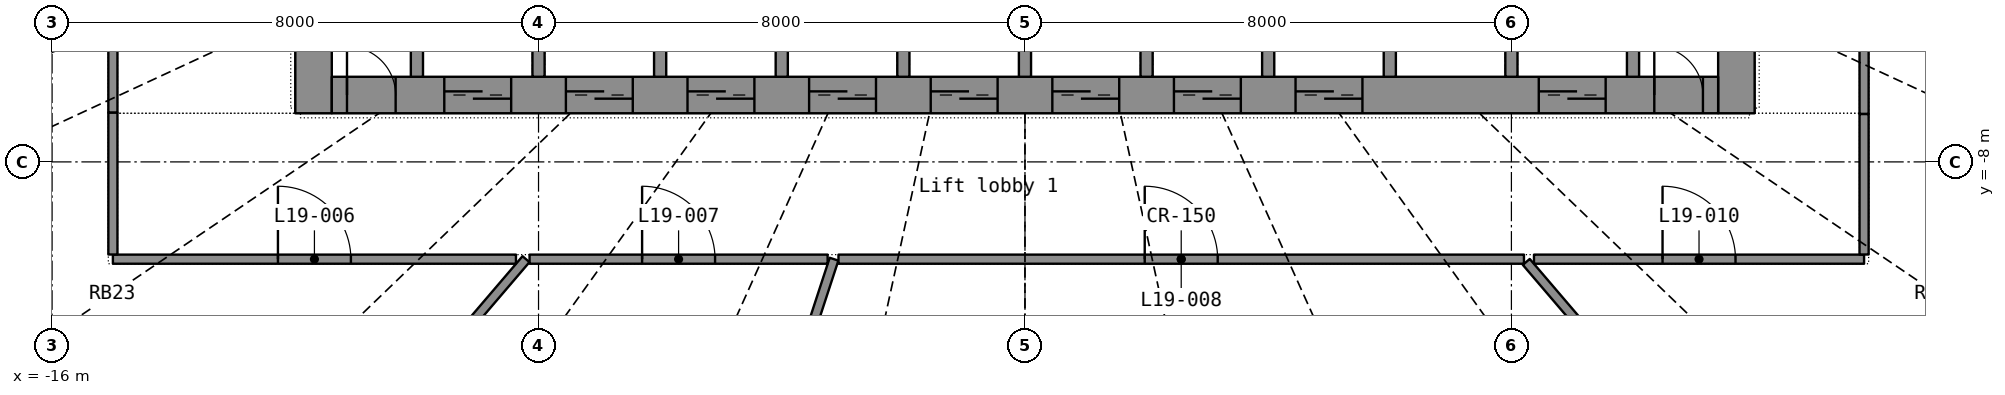
"""IFC4 building model, lengths in metres.
Left out: names, types, materials, properties, quantities, classifications, styles, units other than length and angle.
Written with IfcOpenShell. Run it as: python <this file> out.ifc"""

import sys

from ifc_helpers import new_model, si_unit, direction, frame, frame_2d, origin, place, context, subcontext, project, spatial, rectangle, extrude, element, fill, save


model = new_model("IFC4")
c1 = context("Model", 3, precision=1e-05, world=origin(), true_north=direction((0.0, 1.0)))
c2 = subcontext(c1, "Body", "Model", "MODEL_VIEW")
j1 = project(units=[si_unit("LENGTHUNIT", "METRE"), si_unit("PLANEANGLEUNIT", "RADIAN")], contexts=[c1])
p1 = place(None, origin())
s1 = spatial("IfcSite", under=j1, at=p1, CompositionType="ELEMENT")
p2 = place(p1, origin())
s2 = spatial("IfcBuilding", under=s1, at=p2, CompositionType="ELEMENT")
p3 = place(p2, frame((0.0, 0.0, 81.5)))
s3 = spatial("IfcBuildingStorey", under=s2, at=p3, CompositionType="ELEMENT", Elevation=81.5)
p4 = place(p3, frame((-11.7, -7.2, 0.0), z_axis=(0.0, 0.0, 1.0), x_axis=(0.0, 1.0, 0.0)))
e1 = element("IfcWall", 1, at=p4, inside=s3, PredefinedType="SHEAR", context=c2, shape_type="SweptSolid", body=[
    extrude(rectangle(XDim=14.4, YDim=0.6, at=frame_2d((7.2, 0.0))), origin(), (0.0, 0.0, 1.0), 3.3),
])
p5 = place(p4, frame((6.5, 0.0, 0.0)))
e2 = element("IfcOpeningElement", 2, at=p5, cuts=e1, PredefinedType="OPENING", context=c2, shape_type="SweptSolid", body=[
    extrude(rectangle(XDim=1.4, YDim=2.2, at=frame_2d((0.7, 1.1))), frame((0.0, 0.31, 0.0), z_axis=(0.0, -1.0, 0.0), x_axis=(1.0, 0.0, 0.0)), (0.0, 0.0, 1.0), 0.62),
])
p6 = place(p3, frame((11.7, -7.2, 0.0), z_axis=(0.0, 0.0, 1.0), x_axis=(0.0, 1.0, 0.0)))
e3 = element("IfcWall", 3, at=p6, inside=s3, PredefinedType="SHEAR", context=c2, shape_type="SweptSolid", body=[
    extrude(rectangle(XDim=14.4, YDim=0.6, at=frame_2d((7.2, 0.0))), origin(), (0.0, 0.0, 1.0), 3.3),
])
p7 = place(p6, frame((6.5, 0.0, 0.0)))
e4 = element("IfcOpeningElement", 4, at=p7, cuts=e3, PredefinedType="OPENING", context=c2, shape_type="SweptSolid", body=[
    extrude(rectangle(XDim=1.4, YDim=2.2, at=frame_2d((0.7, 1.1))), frame((0.0, 0.31, 0.0), z_axis=(0.0, -1.0, 0.0), x_axis=(1.0, 0.0, 0.0)), (0.0, 0.0, 1.0), 0.62),
])
p8 = place(p3, frame((-11.4, -6.9, 0.0), z_axis=(0.0, 0.0, 1.0), x_axis=(1.0, 0.0, 0.0)))
e5 = element("IfcWall", 5, at=p8, inside=s3, PredefinedType="SHEAR", context=c2, shape_type="SweptSolid", body=[
    extrude(rectangle(XDim=22.8, YDim=0.6, at=frame_2d((11.4, 0.0))), origin(), (0.0, 0.0, 1.0), 3.3),
])
p9 = place(p8, frame((1.85, 0.0, 0.0)))
e6 = element("IfcOpeningElement", 6, at=p9, cuts=e5, PredefinedType="OPENING", context=c2, shape_type="SweptSolid", body=[
    extrude(rectangle(XDim=1.1, YDim=2.2, at=frame_2d((0.55, 1.1))), frame((0.0, 0.31, 0.0), z_axis=(0.0, -1.0, 0.0), x_axis=(1.0, 0.0, 0.0)), (0.0, 0.0, 1.0), 0.62),
])
p10 = place(p8, frame((3.85, 0.0, 0.0)))
e7 = element("IfcOpeningElement", 7, at=p10, cuts=e5, PredefinedType="OPENING", context=c2, shape_type="SweptSolid", body=[
    extrude(rectangle(XDim=1.1, YDim=2.2, at=frame_2d((0.55, 1.1))), frame((0.0, 0.31, 0.0), z_axis=(0.0, -1.0, 0.0), x_axis=(1.0, 0.0, 0.0)), (0.0, 0.0, 1.0), 0.62),
])
p11 = place(p8, frame((5.85, 0.0, 0.0)))
e8 = element("IfcOpeningElement", 8, at=p11, cuts=e5, PredefinedType="OPENING", context=c2, shape_type="SweptSolid", body=[
    extrude(rectangle(XDim=1.1, YDim=2.2, at=frame_2d((0.55, 1.1))), frame((0.0, 0.31, 0.0), z_axis=(0.0, -1.0, 0.0), x_axis=(1.0, 0.0, 0.0)), (0.0, 0.0, 1.0), 0.62),
])
p12 = place(p8, frame((7.85, 0.0, 0.0)))
e9 = element("IfcOpeningElement", 9, at=p12, cuts=e5, PredefinedType="OPENING", context=c2, shape_type="SweptSolid", body=[
    extrude(rectangle(XDim=1.1, YDim=2.2, at=frame_2d((0.55, 1.1))), frame((0.0, 0.31, 0.0), z_axis=(0.0, -1.0, 0.0), x_axis=(1.0, 0.0, 0.0)), (0.0, 0.0, 1.0), 0.62),
])
p13 = place(p8, frame((9.85, 0.0, 0.0)))
e10 = element("IfcOpeningElement", 10, at=p13, cuts=e5, PredefinedType="OPENING", context=c2, shape_type="SweptSolid", body=[
    extrude(rectangle(XDim=1.1, YDim=2.2, at=frame_2d((0.55, 1.1))), frame((0.0, 0.31, 0.0), z_axis=(0.0, -1.0, 0.0), x_axis=(1.0, 0.0, 0.0)), (0.0, 0.0, 1.0), 0.62),
])
p14 = place(p8, frame((11.85, 0.0, 0.0)))
e11 = element("IfcOpeningElement", 11, at=p14, cuts=e5, PredefinedType="OPENING", context=c2, shape_type="SweptSolid", body=[
    extrude(rectangle(XDim=1.1, YDim=2.2, at=frame_2d((0.55, 1.1))), frame((0.0, 0.31, 0.0), z_axis=(0.0, -1.0, 0.0), x_axis=(1.0, 0.0, 0.0)), (0.0, 0.0, 1.0), 0.62),
])
p15 = place(p8, frame((13.85, 0.0, 0.0)))
e12 = element("IfcOpeningElement", 12, at=p15, cuts=e5, PredefinedType="OPENING", context=c2, shape_type="SweptSolid", body=[
    extrude(rectangle(XDim=1.1, YDim=2.2, at=frame_2d((0.55, 1.1))), frame((0.0, 0.31, 0.0), z_axis=(0.0, -1.0, 0.0), x_axis=(1.0, 0.0, 0.0)), (0.0, 0.0, 1.0), 0.62),
])
p16 = place(p8, frame((15.85, 0.0, 0.0)))
e13 = element("IfcOpeningElement", 13, at=p16, cuts=e5, PredefinedType="OPENING", context=c2, shape_type="SweptSolid", body=[
    extrude(rectangle(XDim=1.1, YDim=2.2, at=frame_2d((0.55, 1.1))), frame((0.0, 0.31, 0.0), z_axis=(0.0, -1.0, 0.0), x_axis=(1.0, 0.0, 0.0)), (0.0, 0.0, 1.0), 0.62),
])
p17 = place(p8, frame((19.85, 0.0, 0.0)))
e14 = element("IfcOpeningElement", 14, at=p17, cuts=e5, PredefinedType="OPENING", context=c2, shape_type="SweptSolid", body=[
    extrude(rectangle(XDim=1.1, YDim=2.2, at=frame_2d((0.55, 1.1))), frame((0.0, 0.31, 0.0), z_axis=(0.0, -1.0, 0.0), x_axis=(1.0, 0.0, 0.0)), (0.0, 0.0, 1.0), 0.62),
])
p18 = place(p8, frame((0.25, 0.0, 0.0)))
e15 = element("IfcOpeningElement", 15, at=p18, cuts=e5, PredefinedType="OPENING", context=c2, shape_type="SweptSolid", body=[
    extrude(rectangle(XDim=0.8, YDim=2.05, at=frame_2d((0.4, 1.025))), frame((0.0, 0.31, 0.0), z_axis=(0.0, -1.0, 0.0), x_axis=(1.0, 0.0, 0.0)), (0.0, 0.0, 1.0), 0.62),
])
p19 = place(p8, frame((21.75, 0.0, 0.0)))
e16 = element("IfcOpeningElement", 16, at=p19, cuts=e5, PredefinedType="OPENING", context=c2, shape_type="SweptSolid", body=[
    extrude(rectangle(XDim=0.8, YDim=2.05, at=frame_2d((0.4, 1.025))), frame((0.0, 0.31, 0.0), z_axis=(0.0, -1.0, 0.0), x_axis=(1.0, 0.0, 0.0)), (0.0, 0.0, 1.0), 0.62),
])
for number, where, z_axis, x_axis in (
    (17, (-10.0, -6.6, 0.0), (0.0, 0.0, 1.0), (0.0, 1.0, 0.0)),
    (18, (-8.0, -6.6, 0.0), (0.0, 0.0, 1.0), (0.0, 1.0, 0.0)),
    (19, (-6.0, -6.6, 0.0), (0.0, 0.0, 1.0), (0.0, 1.0, 0.0)),
    (20, (-4.0, -6.6, 0.0), (0.0, 0.0, 1.0), (0.0, 1.0, 0.0)),
    (21, (-2.0, -6.6, 0.0), (0.0, 0.0, 1.0), (0.0, 1.0, 0.0)),
    (22, (0.0, -6.6, 0.0), (0.0, 0.0, 1.0), (0.0, 1.0, 0.0)),
    (23, (2.0, -6.6, 0.0), (0.0, 0.0, 1.0), (0.0, 1.0, 0.0)),
    (24, (4.0, -6.6, 0.0), (0.0, 0.0, 1.0), (0.0, 1.0, 0.0)),
    (25, (6.0, -6.6, 0.0), (0.0, 0.0, 1.0), (0.0, 1.0, 0.0)),
    (26, (8.0, -6.6, 0.0), (0.0, 0.0, 1.0), (0.0, 1.0, 0.0)),
    (27, (10.0, -6.6, 0.0), (0.0, 0.0, 1.0), (0.0, 1.0, 0.0)),
):
    element("IfcWall", number, at=place(p3, frame(where, z_axis=z_axis, x_axis=x_axis)), inside=s3, PredefinedType="SHEAR", context=c2, shape_type="SweptSolid", body=[
        extrude(rectangle(XDim=2.7, YDim=0.2, at=frame_2d((1.35, 0.0))), origin(), (0.0, 0.0, 1.0), 3.3),
    ])
p20 = place(p3, frame((-6.829, -20.875, 0.0), z_axis=(0.0, 0.0, 1.0), x_axis=(0.310906905, 0.95044037, 0.0)))
e28 = element("IfcWall", 28, at=p20, inside=s3, PredefinedType="PARTITIONING", context=c2, shape_type="SweptSolid", body=[
    extrude(rectangle(XDim=11.863, YDim=0.15, at=frame_2d((5.931, 0.0))), origin(), (0.0, 0.0, 1.0), 2.4),
])
p21 = place(p3, frame((-3.067, -9.6, 0.0), z_axis=(0.0, 0.0, 1.0), x_axis=(1.0, 0.0, 0.0)))
e29 = element("IfcWall", 29, at=p21, inside=s3, PredefinedType="PARTITIONING", context=c2, shape_type="SweptSolid", body=[
    extrude(rectangle(XDim=11.273, YDim=0.15, at=frame_2d((5.637, 0.0))), origin(), (0.0, 0.0, 1.0), 2.4),
])
p22 = place(p21, frame((5.037, 0.0, 0.0)))
e30 = element("IfcOpeningElement", 30, at=p22, cuts=e29, PredefinedType="OPENING", context=c2, shape_type="SweptSolid", body=[
    extrude(rectangle(XDim=1.2, YDim=2.2, at=frame_2d((0.6, 1.1))), frame((0.0, 0.085, 0.0), z_axis=(0.0, -1.0, 0.0), x_axis=(1.0, 0.0, 0.0)), (0.0, 0.0, 1.0), 0.17),
])
p23 = place(p3, frame((15.138, -17.708, 0.0), z_axis=(0.0, 0.0, 1.0), x_axis=(-0.649786297, 0.760116944, 0.0)))
e31 = element("IfcWall", 31, at=p23, inside=s3, PredefinedType="PARTITIONING", context=c2, shape_type="SweptSolid", body=[
    extrude(rectangle(XDim=10.608, YDim=0.15, at=frame_2d((5.304, 0.0))), origin(), (0.0, 0.0, 1.0), 2.4),
])
p24 = place(p3, frame((-15.137, -17.707, 0.0), z_axis=(0.0, 0.0, 1.0), x_axis=(0.649786055, 0.76011715, 0.0)))
e32 = element("IfcWall", 32, at=p24, inside=s3, PredefinedType="PARTITIONING", context=c2, shape_type="SweptSolid", body=[
    extrude(rectangle(XDim=10.666, YDim=0.15, at=frame_2d((5.333, 0.0))), origin(), (0.0, 0.0, 1.0), 2.4),
])
p25 = place(p3, frame((-23.929, -9.14, 0.0), z_axis=(0.0, 0.0, 1.0), x_axis=(0.934175823, 0.356813021, 0.0)))
e33 = element("IfcWall", 33, at=p25, inside=s3, PredefinedType="PARTITIONING", context=c2, shape_type="SweptSolid", body=[
    extrude(rectangle(XDim=9.559, YDim=0.15, at=frame_2d((4.779, 0.0))), origin(), (0.0, 0.0, 1.0), 2.4),
])
p26 = place(p3, frame((-15.0, -9.6, 0.0), z_axis=(0.0, 0.0, 1.0), x_axis=(1.0, 0.0, 0.0)))
e34 = element("IfcWall", 34, at=p26, inside=s3, PredefinedType="PARTITIONING", context=c2, shape_type="SweptSolid", body=[
    extrude(rectangle(XDim=6.629, YDim=0.15, at=frame_2d((3.314, 0.0))), origin(), (0.0, 0.0, 1.0), 2.4),
])
p27 = place(p26, frame((2.714, 0.0, 0.0)))
e35 = element("IfcOpeningElement", 35, at=p27, cuts=e34, PredefinedType="OPENING", context=c2, shape_type="SweptSolid", body=[
    extrude(rectangle(XDim=1.2, YDim=2.2, at=frame_2d((0.6, 1.1))), frame((0.0, 0.085, 0.0), z_axis=(0.0, -1.0, 0.0), x_axis=(1.0, 0.0, 0.0)), (0.0, 0.0, 1.0), 0.17),
])
p28 = place(p3, frame((13.8, -7.212, 0.0), z_axis=(0.0, 0.0, 1.0), x_axis=(0.0, 1.0, 0.0)))
e36 = element("IfcWall", 36, at=p28, inside=s3, PredefinedType="PARTITIONING", context=c2, shape_type="SweptSolid", body=[
    extrude(rectangle(XDim=6.14, YDim=0.15, at=frame_2d((3.07, 0.0))), origin(), (0.0, 0.0, 1.0), 2.4),
])
p29 = place(p28, frame((2.47, 0.0, 0.0)))
e37 = element("IfcOpeningElement", 37, at=p29, cuts=e36, PredefinedType="OPENING", context=c2, shape_type="SweptSolid", body=[
    extrude(rectangle(XDim=1.2, YDim=2.2, at=frame_2d((0.6, 1.1))), frame((0.0, 0.085, 0.0), z_axis=(0.0, -1.0, 0.0), x_axis=(1.0, 0.0, 0.0)), (0.0, 0.0, 1.0), 0.17),
])
p30 = place(p3, frame((8.371, -9.6, 0.0), z_axis=(0.0, 0.0, 1.0), x_axis=(1.0, 0.0, 0.0)))
e38 = element("IfcWall", 38, at=p30, inside=s3, PredefinedType="PARTITIONING", context=c2, shape_type="SweptSolid", body=[
    extrude(rectangle(XDim=5.429, YDim=0.15, at=frame_2d((2.714, 0.0))), origin(), (0.0, 0.0, 1.0), 2.4),
])
p31 = place(p30, frame((2.115, 0.0, 0.0)))
e39 = element("IfcOpeningElement", 39, at=p31, cuts=e38, PredefinedType="OPENING", context=c2, shape_type="SweptSolid", body=[
    extrude(rectangle(XDim=1.2, YDim=2.2, at=frame_2d((0.6, 1.1))), frame((0.0, 0.085, 0.0), z_axis=(0.0, -1.0, 0.0), x_axis=(1.0, 0.0, 0.0)), (0.0, 0.0, 1.0), 0.17),
])
p32 = place(p3, frame((-8.147, -9.6, 0.0), z_axis=(0.0, 0.0, 1.0), x_axis=(1.0, 0.0, 0.0)))
e40 = element("IfcWall", 40, at=p32, inside=s3, PredefinedType="PARTITIONING", context=c2, shape_type="SweptSolid", body=[
    extrude(rectangle(XDim=4.902, YDim=0.15, at=frame_2d((2.451, 0.0))), origin(), (0.0, 0.0, 1.0), 2.4),
])
p33 = place(p32, frame((1.851, 0.0, 0.0)))
e41 = element("IfcOpeningElement", 41, at=p33, cuts=e40, PredefinedType="OPENING", context=c2, shape_type="SweptSolid", body=[
    extrude(rectangle(XDim=1.2, YDim=2.2, at=frame_2d((0.6, 1.1))), frame((0.0, 0.085, 0.0), z_axis=(0.0, -1.0, 0.0), x_axis=(1.0, 0.0, 0.0)), (0.0, 0.0, 1.0), 0.17),
])
p34 = place(p3, frame((-15.0, -7.188, 0.0), z_axis=(0.0, 0.0, 1.0), x_axis=(0.0, -1.0, 0.0)))
e42 = element("IfcWall", 42, at=p34, inside=s3, PredefinedType="PARTITIONING", context=c2, shape_type="SweptSolid", body=[
    extrude(rectangle(XDim=2.335, YDim=0.15, at=frame_2d((1.167, 0.0))), origin(), (0.0, 0.0, 1.0), 2.4),
])
p35 = place(p3, frame((13.8, -9.523, 0.0), z_axis=(0.0, 0.0, 1.0), x_axis=(0.0, 1.0, 0.0)))
e43 = element("IfcWall", 43, at=p35, inside=s3, PredefinedType="PARTITIONING", context=c2, shape_type="SweptSolid", body=[
    extrude(rectangle(XDim=2.31, YDim=0.15, at=frame_2d((1.155, 0.0))), origin(), (0.0, 0.0, 1.0), 2.4),
])
p36 = place(p3, frame((-15.0, -5.84, 0.0), z_axis=(0.0, 0.0, 1.0), x_axis=(0.0, -1.0, 0.0)))
e44 = element("IfcWall", 44, at=p36, inside=s3, PredefinedType="PARTITIONING", context=c2, shape_type="SweptSolid", body=[
    extrude(rectangle(XDim=1.347, YDim=0.15, at=frame_2d((0.673, 0.0))), origin(), (0.0, 0.0, 1.0), 2.4),
])
p37 = place(p9, origin())
e45 = element("IfcDoor", 45, at=p37, inside=s3, OperationType="DOUBLE_DOOR_SLIDING", PredefinedType="DOOR", context=c2, shape_type="SweptSolid", body=[
    extrude(rectangle(XDim=1.1, YDim=2.2, at=frame_2d((0.55, 1.1))), frame((0.0, 0.025, 0.0), z_axis=(0.0, -1.0, 0.0), x_axis=(1.0, 0.0, 0.0)), (0.0, 0.0, 1.0), 0.05),
])
fill(e6, e45)
p38 = place(p10, origin())
e46 = element("IfcDoor", 46, at=p38, inside=s3, OperationType="DOUBLE_DOOR_SLIDING", PredefinedType="DOOR", context=c2, shape_type="SweptSolid", body=[
    extrude(rectangle(XDim=1.1, YDim=2.2, at=frame_2d((0.55, 1.1))), frame((0.0, 0.025, 0.0), z_axis=(0.0, -1.0, 0.0), x_axis=(1.0, 0.0, 0.0)), (0.0, 0.0, 1.0), 0.05),
])
fill(e7, e46)
p39 = place(p11, origin())
e47 = element("IfcDoor", 47, at=p39, inside=s3, OperationType="DOUBLE_DOOR_SLIDING", PredefinedType="DOOR", context=c2, shape_type="SweptSolid", body=[
    extrude(rectangle(XDim=1.1, YDim=2.2, at=frame_2d((0.55, 1.1))), frame((0.0, 0.025, 0.0), z_axis=(0.0, -1.0, 0.0), x_axis=(1.0, 0.0, 0.0)), (0.0, 0.0, 1.0), 0.05),
])
fill(e8, e47)
p40 = place(p12, origin())
e48 = element("IfcDoor", 48, at=p40, inside=s3, OperationType="DOUBLE_DOOR_SLIDING", PredefinedType="DOOR", context=c2, shape_type="SweptSolid", body=[
    extrude(rectangle(XDim=1.1, YDim=2.2, at=frame_2d((0.55, 1.1))), frame((0.0, 0.025, 0.0), z_axis=(0.0, -1.0, 0.0), x_axis=(1.0, 0.0, 0.0)), (0.0, 0.0, 1.0), 0.05),
])
fill(e9, e48)
p41 = place(p13, origin())
e49 = element("IfcDoor", 49, at=p41, inside=s3, OperationType="DOUBLE_DOOR_SLIDING", PredefinedType="DOOR", context=c2, shape_type="SweptSolid", body=[
    extrude(rectangle(XDim=1.1, YDim=2.2, at=frame_2d((0.55, 1.1))), frame((0.0, 0.025, 0.0), z_axis=(0.0, -1.0, 0.0), x_axis=(1.0, 0.0, 0.0)), (0.0, 0.0, 1.0), 0.05),
])
fill(e10, e49)
p42 = place(p14, origin())
e50 = element("IfcDoor", 50, at=p42, inside=s3, OperationType="DOUBLE_DOOR_SLIDING", PredefinedType="DOOR", context=c2, shape_type="SweptSolid", body=[
    extrude(rectangle(XDim=1.1, YDim=2.2, at=frame_2d((0.55, 1.1))), frame((0.0, 0.025, 0.0), z_axis=(0.0, -1.0, 0.0), x_axis=(1.0, 0.0, 0.0)), (0.0, 0.0, 1.0), 0.05),
])
fill(e11, e50)
p43 = place(p15, origin())
e51 = element("IfcDoor", 51, at=p43, inside=s3, OperationType="DOUBLE_DOOR_SLIDING", PredefinedType="DOOR", context=c2, shape_type="SweptSolid", body=[
    extrude(rectangle(XDim=1.1, YDim=2.2, at=frame_2d((0.55, 1.1))), frame((0.0, 0.025, 0.0), z_axis=(0.0, -1.0, 0.0), x_axis=(1.0, 0.0, 0.0)), (0.0, 0.0, 1.0), 0.05),
])
fill(e12, e51)
p44 = place(p16, origin())
e52 = element("IfcDoor", 52, at=p44, inside=s3, OperationType="DOUBLE_DOOR_SLIDING", PredefinedType="DOOR", context=c2, shape_type="SweptSolid", body=[
    extrude(rectangle(XDim=1.1, YDim=2.2, at=frame_2d((0.55, 1.1))), frame((0.0, 0.025, 0.0), z_axis=(0.0, -1.0, 0.0), x_axis=(1.0, 0.0, 0.0)), (0.0, 0.0, 1.0), 0.05),
])
fill(e13, e52)
p45 = place(p17, origin())
e53 = element("IfcDoor", 53, at=p45, inside=s3, OperationType="DOUBLE_DOOR_SLIDING", PredefinedType="DOOR", context=c2, shape_type="SweptSolid", body=[
    extrude(rectangle(XDim=1.1, YDim=2.2, at=frame_2d((0.55, 1.1))), frame((0.0, 0.025, 0.0), z_axis=(0.0, -1.0, 0.0), x_axis=(1.0, 0.0, 0.0)), (0.0, 0.0, 1.0), 0.05),
])
fill(e14, e53)
p46 = place(p18, origin())
e54 = element("IfcDoor", 54, at=p46, inside=s3, OperationType="SINGLE_SWING_LEFT", PredefinedType="DOOR", context=c2, shape_type="SweptSolid", body=[
    extrude(rectangle(XDim=0.8, YDim=2.05, at=frame_2d((0.4, 1.025))), frame((0.0, 0.025, 0.0), z_axis=(0.0, -1.0, 0.0), x_axis=(1.0, 0.0, 0.0)), (0.0, 0.0, 1.0), 0.05),
])
fill(e15, e54)
p47 = place(p19, origin())
e55 = element("IfcDoor", 55, at=p47, inside=s3, OperationType="SINGLE_SWING_LEFT", PredefinedType="DOOR", context=c2, shape_type="SweptSolid", body=[
    extrude(rectangle(XDim=0.8, YDim=2.05, at=frame_2d((0.4, 1.025))), frame((0.0, 0.025, 0.0), z_axis=(0.0, -1.0, 0.0), x_axis=(1.0, 0.0, 0.0)), (0.0, 0.0, 1.0), 0.05),
])
fill(e16, e55)
p48 = place(p27, origin())
e56 = element("IfcDoor", 56, at=p48, inside=s3, OperationType="DOUBLE_DOOR_SINGLE_SWING", PredefinedType="DOOR", context=c2, shape_type="SweptSolid", body=[
    extrude(rectangle(XDim=1.2, YDim=2.2, at=frame_2d((0.6, 1.1))), frame((0.0, 0.025, 0.0), z_axis=(0.0, -1.0, 0.0), x_axis=(1.0, 0.0, 0.0)), (0.0, 0.0, 1.0), 0.05),
])
fill(e35, e56)
p49 = place(p33, origin())
e57 = element("IfcDoor", 57, at=p49, inside=s3, OperationType="DOUBLE_DOOR_SINGLE_SWING", PredefinedType="DOOR", context=c2, shape_type="SweptSolid", body=[
    extrude(rectangle(XDim=1.2, YDim=2.2, at=frame_2d((0.6, 1.1))), frame((0.0, 0.025, 0.0), z_axis=(0.0, -1.0, 0.0), x_axis=(1.0, 0.0, 0.0)), (0.0, 0.0, 1.0), 0.05),
])
fill(e41, e57)
p50 = place(p22, origin())
e58 = element("IfcDoor", 58, at=p50, inside=s3, OperationType="DOUBLE_DOOR_SINGLE_SWING", PredefinedType="DOOR", context=c2, shape_type="SweptSolid", body=[
    extrude(rectangle(XDim=1.2, YDim=2.2, at=frame_2d((0.6, 1.1))), frame((0.0, 0.025, 0.0), z_axis=(0.0, -1.0, 0.0), x_axis=(1.0, 0.0, 0.0)), (0.0, 0.0, 1.0), 0.05),
])
fill(e30, e58)
p51 = place(p31, origin())
e59 = element("IfcDoor", 59, at=p51, inside=s3, OperationType="DOUBLE_DOOR_SINGLE_SWING", PredefinedType="DOOR", context=c2, shape_type="SweptSolid", body=[
    extrude(rectangle(XDim=1.2, YDim=2.2, at=frame_2d((0.6, 1.1))), frame((0.0, 0.025, 0.0), z_axis=(0.0, -1.0, 0.0), x_axis=(1.0, 0.0, 0.0)), (0.0, 0.0, 1.0), 0.05),
])
fill(e39, e59)
save(model, sys.argv[1])
